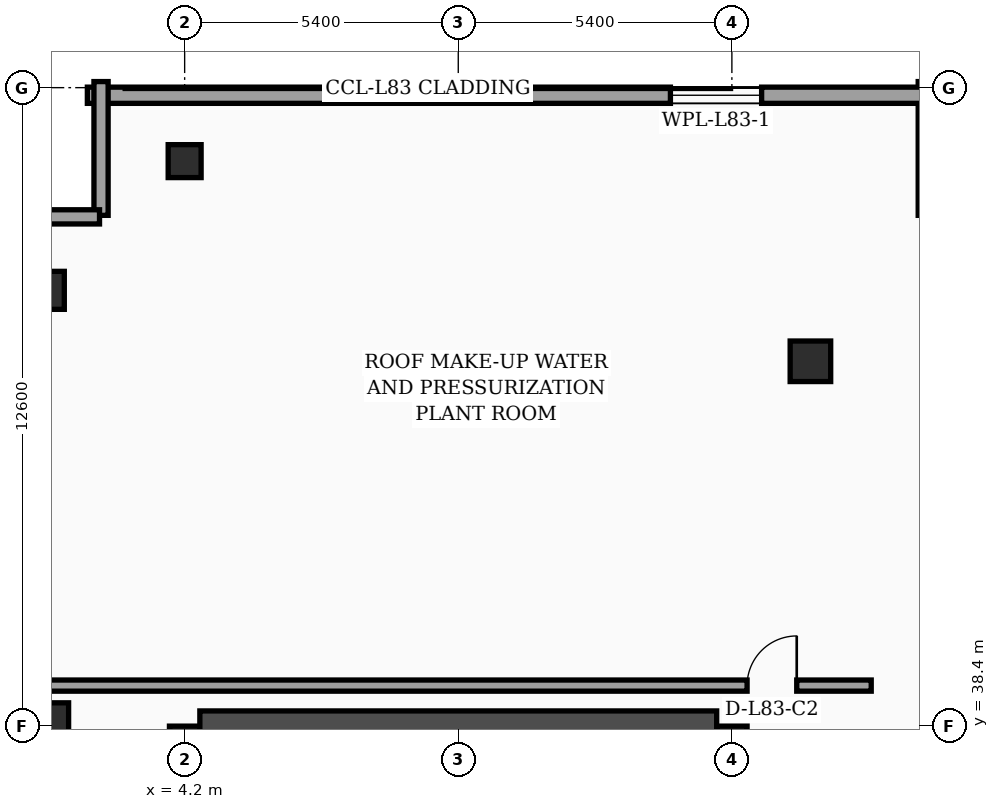
"""IFC4 building model, lengths in metres.
Left out: names, types, materials, properties, quantities, classifications, styles, units other than length and angle.
Written with IfcOpenShell. Run it as: python <this file> out.ifc"""

import sys

from ifc_helpers import new_model, si_unit, direction, frame, frame_2d, origin, origin_2d, place, context, subcontext, project, spatial, rectangle, hollow_rectangle, extrude, element, fill, save


model = new_model("IFC4")
c1 = context("Model", 3, precision=1e-05, world=origin(), true_north=direction((0.0, 1.0)))
c2 = subcontext(c1, "Body", "Model", "MODEL_VIEW")
j1 = project(units=[si_unit("LENGTHUNIT", "METRE"), si_unit("PLANEANGLEUNIT", "RADIAN")], contexts=[c1])
p1 = place(None, origin())
s1 = spatial("IfcSite", under=j1, at=p1, CompositionType="ELEMENT")
p2 = place(p1, origin())
s2 = spatial("IfcBuilding", under=s1, at=p2, CompositionType="ELEMENT")
p3 = place(p2, frame((0.0, 0.0, 340.5)))
s3 = spatial("IfcBuildingStorey", under=s2, at=p3, CompositionType="ELEMENT", Elevation=340.5)
p4 = place(p3, frame((4.2, 16.8, 0.0), z_axis=(0.0, 0.0, 1.0), x_axis=(0.0, 1.0, 0.0)))
e1 = element("IfcWall", 1, at=p4, inside=s3, PredefinedType="SHEAR", context=c2, shape_type="SweptSolid", body=[
    extrude(rectangle(XDim=21.6, YDim=0.6, at=frame_2d((10.8, 0.0))), origin(), (0.0, 0.0, 1.0), 4.76),
])
p5 = place(p3, frame((15.0, 16.8, 0.0), z_axis=(0.0, 0.0, 1.0), x_axis=(0.0, 1.0, 0.0)))
e2 = element("IfcWall", 2, at=p5, inside=s3, PredefinedType="SHEAR", context=c2, shape_type="SweptSolid", body=[
    extrude(rectangle(XDim=21.6, YDim=0.6, at=frame_2d((10.8, 0.0))), origin(), (0.0, 0.0, 1.0), 4.76),
])
p6 = place(p5, frame((8.65, 0.0, 0.0)))
e3 = element("IfcOpeningElement", 3, at=p6, cuts=e2, PredefinedType="OPENING", context=c2, shape_type="SweptSolid", body=[
    extrude(rectangle(XDim=1.1, YDim=2.2, at=frame_2d((0.55, 1.1))), frame((0.0, 0.31, 0.0), z_axis=(0.0, -1.0, 0.0), x_axis=(1.0, 0.0, 0.0)), (0.0, 0.0, 1.0), 0.62),
])
p7 = place(p3, frame((4.5, 38.4, 0.0), z_axis=(0.0, 0.0, 1.0), x_axis=(1.0, 0.0, 0.0)))
e4 = element("IfcWall", 4, at=p7, inside=s3, PredefinedType="SHEAR", context=c2, shape_type="SweptSolid", body=[
    extrude(rectangle(XDim=10.2, YDim=0.6, at=frame_2d((5.1, 0.0))), origin(), (0.0, 0.0, 1.0), 4.76),
])
p8 = place(p3, frame((1.45, 38.4, 0.0), z_axis=(0.0, 0.0, 1.0), x_axis=(1.0, 0.0, 0.0)))
e5 = element("IfcColumn", 5, at=p8, inside=s3, PredefinedType="COLUMN", context=c2, shape_type="SweptSolid", body=[
    extrude(rectangle(XDim=0.92, YDim=0.92, at=origin_2d()), origin(), (0.0, 0.0, 1.0), 4.76),
])
p9 = place(p3, frame((1.45, 47.0, 0.0), z_axis=(0.0, 0.0, 1.0), x_axis=(1.0, 0.0, 0.0)))
e6 = element("IfcColumn", 6, at=p9, inside=s3, PredefinedType="COLUMN", context=c2, shape_type="SweptSolid", body=[
    extrude(hollow_rectangle(XDim=0.75, YDim=0.75, WallThickness=0.032, at=origin_2d()), origin(), (0.0, 0.0, 1.0), 4.76),
])
p10 = place(p3, frame((4.2, 49.55, 0.0), z_axis=(0.0, 0.0, 1.0), x_axis=(1.0, 0.0, 0.0)))
e7 = element("IfcColumn", 7, at=p10, inside=s3, PredefinedType="COLUMN", context=c2, shape_type="SweptSolid", body=[
    extrude(hollow_rectangle(XDim=0.65, YDim=0.65, WallThickness=0.028, at=origin_2d()), origin(), (0.0, 0.0, 1.0), 4.76),
])
p11 = place(p3, frame((16.55, 45.6, 0.0), z_axis=(0.0, 0.0, 1.0), x_axis=(1.0, 0.0, 0.0)))
e8 = element("IfcColumn", 8, at=p11, inside=s3, PredefinedType="COLUMN", context=c2, shape_type="SweptSolid", body=[
    extrude(rectangle(XDim=0.8, YDim=0.8, at=origin_2d()), origin(), (0.0, 0.0, 1.0), 4.76),
])
p12 = place(p3, frame((18.817, 48.48, 0.0), z_axis=(0.0, 0.0, 1.0), x_axis=(0.0, 1.0, 0.0)))
e9 = element("IfcWall", 9, at=p12, inside=s3, PredefinedType="SOLIDWALL", context=c2, shape_type="SweptSolid", body=[
    extrude(rectangle(XDim=2.64, YDim=0.28, at=frame_2d((1.32, 0.0))), origin(), (0.0, 0.0, 1.0), 4.76),
])
p13 = place(p3, frame((19.087, 50.85, 0.0), z_axis=(0.0, 0.0, 1.0), x_axis=(-1.0, 0.0, 0.0)))
e10 = element("IfcWall", 10, at=p13, inside=s3, PredefinedType="SOLIDWALL", context=c2, shape_type="SweptSolid", body=[
    extrude(rectangle(XDim=16.807, YDim=0.32, at=frame_2d((8.403, 0.0))), origin(), (0.0, 0.0, 1.0), 4.76),
])
p14 = place(p13, frame((3.5, 0.0, 1.1)))
e11 = element("IfcOpeningElement", 11, at=p14, cuts=e10, PredefinedType="OPENING", context=c2, shape_type="SweptSolid", body=[
    extrude(rectangle(XDim=1.8, YDim=1.5, at=frame_2d((0.9, 0.75))), frame((0.0, 0.17, 0.0), z_axis=(0.0, -1.0, 0.0), x_axis=(1.0, 0.0, 0.0)), (0.0, 0.0, 1.0), 0.34),
])
for number, where, z_axis, x_axis in (
    (12, (2.55, 51.12, 0.0), (0.0, 0.0, 1.0), (0.0, -1.0, 0.0)),
    (13, (2.52, 48.45, 0.0), (0.0, 0.0, 1.0), (-1.0, 0.0, 0.0)),
):
    element("IfcWall", number, at=place(p3, frame(where, z_axis=z_axis, x_axis=x_axis)), inside=s3, PredefinedType="SOLIDWALL", context=c2, shape_type="SweptSolid", body=[
        extrude(rectangle(XDim=2.64, YDim=0.28, at=frame_2d((1.32, 0.0))), origin(), (0.0, 0.0, 1.0), 4.76),
    ])
p15 = place(p3, frame((0.08, 39.2, 0.0), z_axis=(0.0, 0.0, 1.0), x_axis=(1.0, 0.0, 0.0)))
e14 = element("IfcWall", 14, at=p15, inside=s3, PredefinedType="SOLIDWALL", context=c2, shape_type="SweptSolid", body=[
    extrude(rectangle(XDim=17.67, YDim=0.22, at=frame_2d((8.835, 0.0))), origin(), (0.0, 0.0, 1.0), 4.19),
])
p16 = place(p15, frame((15.22, 0.0, 0.0)))
e15 = element("IfcOpeningElement", 15, at=p16, cuts=e14, PredefinedType="OPENING", context=c2, shape_type="SweptSolid", body=[
    extrude(rectangle(XDim=0.98, YDim=2.15, at=frame_2d((0.49, 1.075))), frame((0.0, 0.12, 0.0), z_axis=(0.0, -1.0, 0.0), x_axis=(1.0, 0.0, 0.0)), (0.0, 0.0, 1.0), 0.24),
])
p17 = place(p14, origin())
e16 = element("IfcWindow", 16, at=p17, inside=s3, PartitioningType="SINGLE_PANEL", PredefinedType="WINDOW", context=c2, shape_type="SweptSolid", body=[
    extrude(rectangle(XDim=1.8, YDim=1.5, at=frame_2d((0.9, 0.75))), frame((0.0, 0.03, 0.0), z_axis=(0.0, -1.0, 0.0), x_axis=(1.0, 0.0, 0.0)), (0.0, 0.0, 1.0), 0.06),
])
fill(e11, e16)
p18 = place(p16, origin())
e17 = element("IfcDoor", 17, at=p18, inside=s3, OperationType="SINGLE_SWING_RIGHT", PredefinedType="DOOR", context=c2, shape_type="SweptSolid", body=[
    extrude(rectangle(XDim=0.98, YDim=2.15, at=frame_2d((0.49, 1.075))), frame((0.0, 0.025, 0.0), z_axis=(0.0, -1.0, 0.0), x_axis=(1.0, 0.0, 0.0)), (0.0, 0.0, 1.0), 0.05),
])
fill(e15, e17)
save(model, sys.argv[1])
